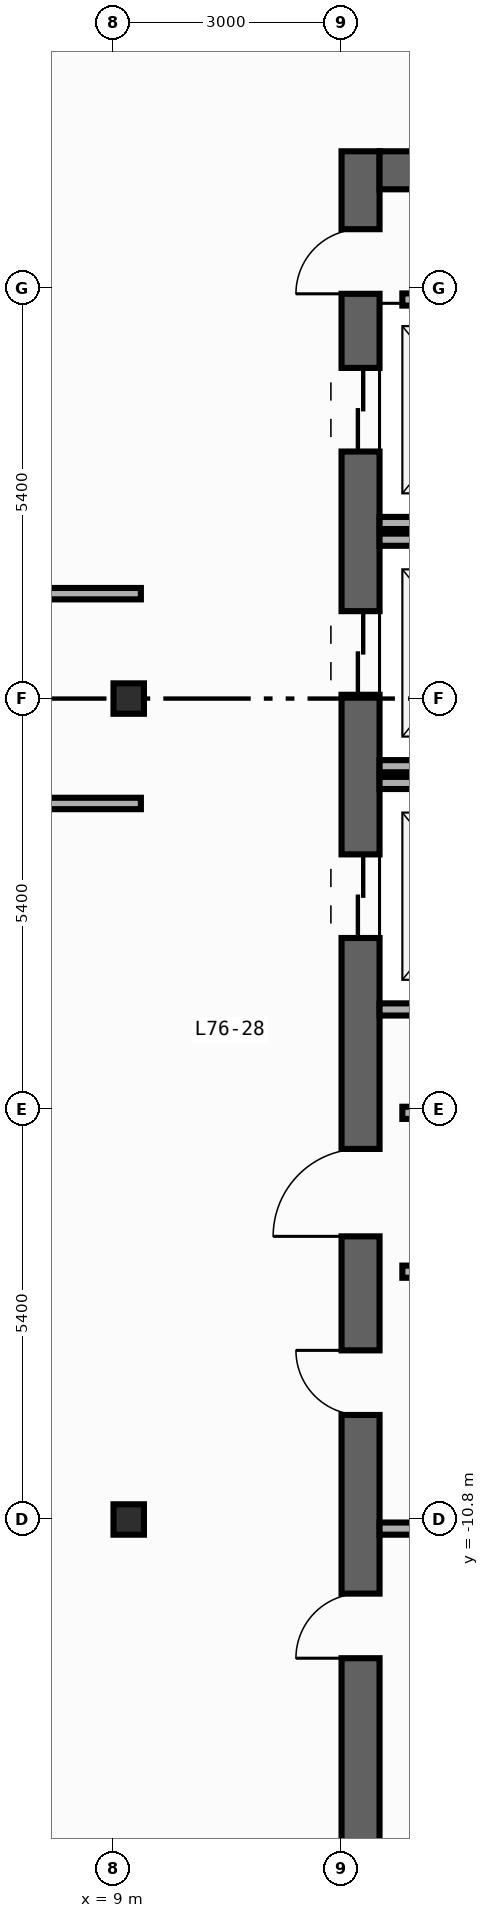
"""IFC4 building model, lengths in metres.
Left out: names, types, materials, properties, quantities, classifications, styles, units other than length and angle.
Written with IfcOpenShell. Run it as: python <this file> out.ifc"""

import sys

from ifc_helpers import new_model, si_unit, direction, frame, frame_2d, origin, origin_2d, place, context, subcontext, project, spatial, rectangle, i_section, extrude, element, fill, save


model = new_model("IFC4")
c1 = context("Model", 3, precision=1e-05, world=origin(), true_north=direction((0.0, 1.0)))
c2 = subcontext(c1, "Body", "Model", "MODEL_VIEW")
j1 = project(units=[si_unit("LENGTHUNIT", "METRE"), si_unit("PLANEANGLEUNIT", "RADIAN")], contexts=[c1])
p1 = place(None, origin())
s1 = spatial("IfcSite", under=j1, at=p1, CompositionType="ELEMENT")
p2 = place(p1, origin())
s2 = spatial("IfcBuilding", under=s1, at=p2, CompositionType="ELEMENT")
p3 = place(p2, frame((0.0, 0.0, 315.6)))
s3 = spatial("IfcBuildingStorey", under=s2, at=p3, CompositionType="ELEMENT", Elevation=315.6)
p4 = place(p3, frame((12.25, -19.8, 0.0), z_axis=(0.0, 0.0, 1.0), x_axis=(0.0, 1.0, 0.0)))
e1 = element("IfcWall", 1, at=p4, inside=s3, PredefinedType="SHEAR", context=c2, shape_type="SweptSolid", body=[
    extrude(rectangle(XDim=27.0, YDim=0.5, at=frame_2d((13.5, 0.0))), origin(), (0.0, 0.0, 1.0), 4.54),
])
p5 = place(p4, frame((23.05, 0.0, 0.0)))
e2 = element("IfcOpeningElement", 2, at=p5, cuts=e1, PredefinedType="OPENING", context=c2, shape_type="SweptSolid", body=[
    extrude(rectangle(XDim=1.1, YDim=2.2, at=frame_2d((0.55, 1.1))), frame((0.0, 0.26, 0.0), z_axis=(0.0, -1.0, 0.0), x_axis=(1.0, 0.0, 0.0)), (0.0, 0.0, 1.0), 0.52),
])
p6 = place(p4, frame((19.85, 0.0, 0.0)))
e3 = element("IfcOpeningElement", 3, at=p6, cuts=e1, PredefinedType="OPENING", context=c2, shape_type="SweptSolid", body=[
    extrude(rectangle(XDim=1.1, YDim=2.2, at=frame_2d((0.55, 1.1))), frame((0.0, 0.26, 0.0), z_axis=(0.0, -1.0, 0.0), x_axis=(1.0, 0.0, 0.0)), (0.0, 0.0, 1.0), 0.52),
])
p7 = place(p4, frame((16.65, 0.0, 0.0)))
e4 = element("IfcOpeningElement", 4, at=p7, cuts=e1, PredefinedType="OPENING", context=c2, shape_type="SweptSolid", body=[
    extrude(rectangle(XDim=1.1, YDim=2.2, at=frame_2d((0.55, 1.1))), frame((0.0, 0.26, 0.0), z_axis=(0.0, -1.0, 0.0), x_axis=(1.0, 0.0, 0.0)), (0.0, 0.0, 1.0), 0.52),
])
p8 = place(p4, frame((7.175, 0.0, 0.0)))
e5 = element("IfcOpeningElement", 5, at=p8, cuts=e1, PredefinedType="OPENING", context=c2, shape_type="SweptSolid", body=[
    extrude(rectangle(XDim=0.85, YDim=2.1, at=frame_2d((0.425, 1.05))), frame((0.0, 0.26, 0.0), z_axis=(0.0, -1.0, 0.0), x_axis=(1.0, 0.0, 0.0)), (0.0, 0.0, 1.0), 0.52),
])
p9 = place(p4, frame((10.375, 0.0, 0.0)))
e6 = element("IfcOpeningElement", 6, at=p9, cuts=e1, PredefinedType="OPENING", context=c2, shape_type="SweptSolid", body=[
    extrude(rectangle(XDim=0.85, YDim=2.1, at=frame_2d((0.425, 1.05))), frame((0.0, 0.26, 0.0), z_axis=(0.0, -1.0, 0.0), x_axis=(1.0, 0.0, 0.0)), (0.0, 0.0, 1.0), 0.52),
])
p10 = place(p4, frame((12.725, 0.0, 0.0)))
e7 = element("IfcOpeningElement", 7, at=p10, cuts=e1, PredefinedType="OPENING", context=c2, shape_type="SweptSolid", body=[
    extrude(rectangle(XDim=1.15, YDim=2.2, at=frame_2d((0.575, 1.1))), frame((0.0, 0.26, 0.0), z_axis=(0.0, -1.0, 0.0), x_axis=(1.0, 0.0, 0.0)), (0.0, 0.0, 1.0), 0.52),
])
p11 = place(p4, frame((25.125, 0.0, 0.0)))
e8 = element("IfcOpeningElement", 8, at=p11, cuts=e1, PredefinedType="OPENING", context=c2, shape_type="SweptSolid", body=[
    extrude(rectangle(XDim=0.85, YDim=2.1, at=frame_2d((0.425, 1.05))), frame((0.0, 0.26, 0.0), z_axis=(0.0, -1.0, 0.0), x_axis=(1.0, 0.0, 0.0)), (0.0, 0.0, 1.0), 0.52),
])
p12 = place(p3, frame((12.5, 6.95, 0.0), z_axis=(0.0, 0.0, 1.0), x_axis=(1.0, 0.0, 0.0)))
e9 = element("IfcWall", 9, at=p12, inside=s3, PredefinedType="SHEAR", context=c2, shape_type="SweptSolid", body=[
    extrude(rectangle(XDim=7.4, YDim=0.5, at=frame_2d((3.7, 0.0))), origin(), (0.0, 0.0, 1.0), 4.54),
])
for number, where, z_axis, x_axis in (
    (10, (9.2, -10.8, 0.0), (0.0, 0.0, 1.0), (1.0, 0.0, 0.0)),
    (11, (9.2, 0.0, 0.0), (0.0, 0.0, 1.0), (1.0, 0.0, 0.0)),
):
    element("IfcColumn", number, at=place(p3, frame(where, z_axis=z_axis, x_axis=x_axis)), inside=s3, PredefinedType="COLUMN", context=c2, shape_type="SweptSolid", body=[
        extrude(i_section(OverallWidth=0.4, OverallDepth=0.4, WebThickness=0.013, FlangeThickness=0.021, FilletRadius=0.022, at=origin_2d()), origin(), (0.0, 0.0, 1.0), 4.8),
    ])
for number, where, z_axis, x_axis in (
    (12, (12.5, 2.31, 0.0), (0.0, 0.0, 1.0), (1.0, 0.0, 0.0)),
    (13, (12.5, -0.89, 0.0), (0.0, 0.0, 1.0), (1.0, 0.0, 0.0)),
    (14, (12.5, 2.09, 0.0), (0.0, 0.0, 1.0), (1.0, 0.0, 0.0)),
    (15, (12.5, -4.09, 0.0), (0.0, 0.0, 1.0), (1.0, 0.0, 0.0)),
    (16, (12.5, -1.11, 0.0), (0.0, 0.0, 1.0), (1.0, 0.0, 0.0)),
):
    element("IfcWall", number, at=place(p3, frame(where, z_axis=z_axis, x_axis=x_axis)), inside=s3, PredefinedType="STANDARD", context=c2, shape_type="SweptSolid", body=[
        extrude(rectangle(XDim=2.49, YDim=0.16, at=frame_2d((1.245, 0.0))), origin(), (0.0, 0.0, 1.0), 4.54),
    ])
for number, where, z_axis, x_axis in (
    (17, (12.8, -5.45, 0.0), (0.0, 0.0, 1.0), (1.0, 0.0, 0.0)),
    (18, (12.8, -7.54, 0.0), (0.0, 0.0, 1.0), (1.0, 0.0, 0.0)),
    (19, (12.8, 5.25, 0.0), (0.0, 0.0, 1.0), (1.0, 0.0, 0.0)),
):
    element("IfcWall", number, at=place(p3, frame(where, z_axis=z_axis, x_axis=x_axis)), inside=s3, PredefinedType="STANDARD", context=c2, shape_type="SweptSolid", body=[
        extrude(rectangle(XDim=2.6, YDim=0.16, at=frame_2d((1.3, 0.0))), origin(), (0.0, 0.0, 1.0), 4.54),
    ])
p13 = place(p3, frame((12.5, -10.92, 0.0), z_axis=(0.0, 0.0, 1.0), x_axis=(1.0, 0.0, 0.0)))
e20 = element("IfcWall", 20, at=p13, inside=s3, PredefinedType="PARTITIONING", context=c2, shape_type="SweptSolid", body=[
    extrude(rectangle(XDim=2.9, YDim=0.16, at=frame_2d((1.45, 0.0))), origin(), (0.0, 0.0, 1.0), 3.64),
])
p14 = place(p3, frame((-9.36, -1.38, 0.0), z_axis=(0.0, 0.0, 1.0), x_axis=(1.0, 0.0, 0.0)))
e21 = element("IfcWall", 21, at=p14, inside=s3, PredefinedType="PARTITIONING", context=c2, shape_type="SweptSolid", body=[
    extrude(rectangle(XDim=18.72, YDim=0.15, at=frame_2d((9.36, 0.0))), origin(), (0.0, 0.0, 1.0), 4.54),
])
p15 = place(p14, frame((8.91, 0.0, 0.0)))
e22 = element("IfcOpeningElement", 22, at=p15, cuts=e21, PredefinedType="OPENING", context=c2, shape_type="SweptSolid", body=[
    extrude(rectangle(XDim=0.9, YDim=2.15, at=frame_2d((0.45, 1.075))), frame((0.0, 0.085, 0.0), z_axis=(0.0, -1.0, 0.0), x_axis=(1.0, 0.0, 0.0)), (0.0, 0.0, 1.0), 0.17),
])
p16 = place(p3, frame((4.72, 1.38, 0.0), z_axis=(0.0, 0.0, 1.0), x_axis=(1.0, 0.0, 0.0)))
e23 = element("IfcWall", 23, at=p16, inside=s3, PredefinedType="PARTITIONING", context=c2, shape_type="SweptSolid", body=[
    extrude(rectangle(XDim=4.64, YDim=0.15, at=frame_2d((2.32, 0.0))), origin(), (0.0, 0.0, 1.0), 4.54),
])
p17 = place(p16, frame((0.46, 0.0, 0.0)))
e24 = element("IfcOpeningElement", 24, at=p17, cuts=e23, PredefinedType="OPENING", context=c2, shape_type="SweptSolid", body=[
    extrude(rectangle(XDim=0.9, YDim=2.15, at=frame_2d((0.45, 1.075))), frame((0.0, 0.085, 0.0), z_axis=(0.0, -1.0, 0.0), x_axis=(1.0, 0.0, 0.0)), (0.0, 0.0, 1.0), 0.17),
])
p18 = place(p5, origin())
e25 = element("IfcDoor", 25, at=p18, inside=s3, OperationType="DOUBLE_DOOR_SLIDING", PredefinedType="DOOR", context=c2, shape_type="SweptSolid", body=[
    extrude(rectangle(XDim=1.1, YDim=2.2, at=frame_2d((0.55, 1.1))), frame((0.0, 0.025, 0.0), z_axis=(0.0, -1.0, 0.0), x_axis=(1.0, 0.0, 0.0)), (0.0, 0.0, 1.0), 0.05),
])
fill(e2, e25)
p19 = place(p6, origin())
e26 = element("IfcDoor", 26, at=p19, inside=s3, OperationType="DOUBLE_DOOR_SLIDING", PredefinedType="DOOR", context=c2, shape_type="SweptSolid", body=[
    extrude(rectangle(XDim=1.1, YDim=2.2, at=frame_2d((0.55, 1.1))), frame((0.0, 0.025, 0.0), z_axis=(0.0, -1.0, 0.0), x_axis=(1.0, 0.0, 0.0)), (0.0, 0.0, 1.0), 0.05),
])
fill(e3, e26)
p20 = place(p7, origin())
e27 = element("IfcDoor", 27, at=p20, inside=s3, OperationType="DOUBLE_DOOR_SLIDING", PredefinedType="DOOR", context=c2, shape_type="SweptSolid", body=[
    extrude(rectangle(XDim=1.1, YDim=2.2, at=frame_2d((0.55, 1.1))), frame((0.0, 0.025, 0.0), z_axis=(0.0, -1.0, 0.0), x_axis=(1.0, 0.0, 0.0)), (0.0, 0.0, 1.0), 0.05),
])
fill(e4, e27)
p21 = place(p8, origin())
e28 = element("IfcDoor", 28, at=p21, inside=s3, OperationType="SINGLE_SWING_LEFT", PredefinedType="DOOR", context=c2, shape_type="SweptSolid", body=[
    extrude(rectangle(XDim=0.85, YDim=2.1, at=frame_2d((0.425, 1.05))), frame((0.0, 0.025, 0.0), z_axis=(0.0, -1.0, 0.0), x_axis=(1.0, 0.0, 0.0)), (0.0, 0.0, 1.0), 0.05),
])
fill(e5, e28)
p22 = place(p9, origin())
e29 = element("IfcDoor", 29, at=p22, inside=s3, OperationType="SINGLE_SWING_RIGHT", PredefinedType="DOOR", context=c2, shape_type="SweptSolid", body=[
    extrude(rectangle(XDim=0.85, YDim=2.1, at=frame_2d((0.425, 1.05))), frame((0.0, 0.025, 0.0), z_axis=(0.0, -1.0, 0.0), x_axis=(1.0, 0.0, 0.0)), (0.0, 0.0, 1.0), 0.05),
])
fill(e6, e29)
p23 = place(p10, origin())
e30 = element("IfcDoor", 30, at=p23, inside=s3, OperationType="SINGLE_SWING_LEFT", PredefinedType="DOOR", context=c2, shape_type="SweptSolid", body=[
    extrude(rectangle(XDim=1.15, YDim=2.2, at=frame_2d((0.575, 1.1))), frame((0.0, 0.025, 0.0), z_axis=(0.0, -1.0, 0.0), x_axis=(1.0, 0.0, 0.0)), (0.0, 0.0, 1.0), 0.05),
])
fill(e7, e30)
p24 = place(p11, origin())
e31 = element("IfcDoor", 31, at=p24, inside=s3, OperationType="SINGLE_SWING_LEFT", PredefinedType="DOOR", context=c2, shape_type="SweptSolid", body=[
    extrude(rectangle(XDim=0.85, YDim=2.1, at=frame_2d((0.425, 1.05))), frame((0.0, 0.025, 0.0), z_axis=(0.0, -1.0, 0.0), x_axis=(1.0, 0.0, 0.0)), (0.0, 0.0, 1.0), 0.05),
])
fill(e8, e31)
save(model, sys.argv[1])
